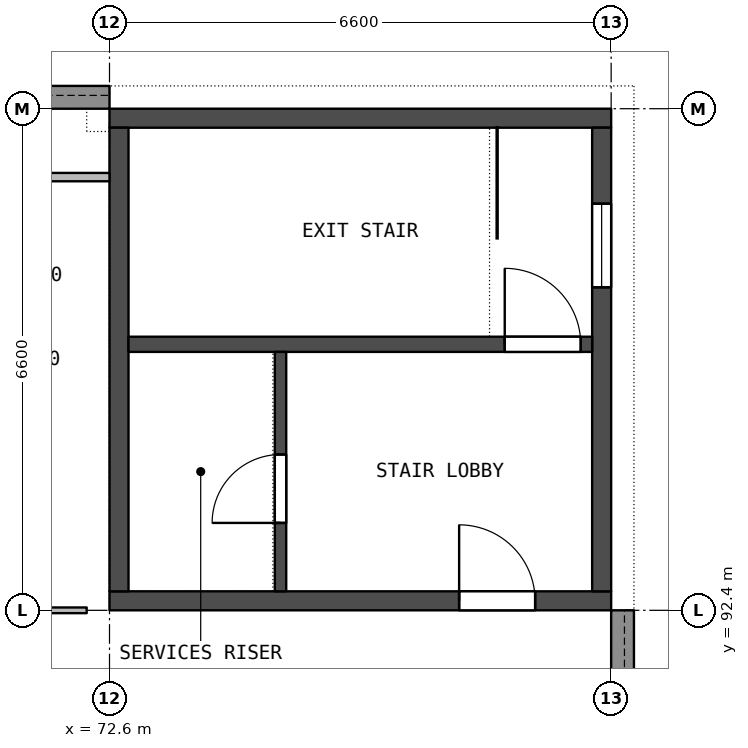
"""IFC4 building model, lengths in metres.
Left out: names, types, materials, properties, quantities, classifications, styles, units other than length and angle.
Written with IfcOpenShell. Run it as: python <this file> out.ifc"""

import sys

from ifc_helpers import new_model, si_unit, direction, frame, frame_2d, origin, place, context, subcontext, project, spatial, rectangle, extrude, element, fill, save


model = new_model("IFC4")
c1 = context("Model", 3, precision=1e-05, world=origin(), true_north=direction((0.0, 1.0)))
c2 = subcontext(c1, "Body", "Model", "MODEL_VIEW")
j1 = project(units=[si_unit("LENGTHUNIT", "METRE"), si_unit("PLANEANGLEUNIT", "RADIAN")], contexts=[c1])
p1 = place(None, origin())
s1 = spatial("IfcSite", under=j1, at=p1, CompositionType="ELEMENT")
p2 = place(p1, origin())
s2 = spatial("IfcBuilding", under=s1, at=p2, CompositionType="ELEMENT")
p3 = place(p2, frame((0.0, 0.0, 18.9)))
s3 = spatial("IfcBuildingStorey", under=s2, at=p3, CompositionType="ELEMENT", Elevation=18.9)
p4 = place(p3, frame((72.6, 92.525, 0.0), z_axis=(0.0, 0.0, 1.0), x_axis=(1.0, 0.0, 0.0)))
e1 = element("IfcWall", 1, at=p4, inside=s3, PredefinedType="SHEAR", context=c2, shape_type="SweptSolid", body=[
    extrude(rectangle(XDim=6.6, YDim=0.25, at=frame_2d((3.3, 0.0))), origin(), (0.0, 0.0, 1.0), 4.25),
])
p5 = place(p4, frame((4.6, 0.0, 0.0)))
e2 = element("IfcOpeningElement", 2, at=p5, cuts=e1, PredefinedType="OPENING", context=c2, shape_type="SweptSolid", body=[
    extrude(rectangle(XDim=1.0, YDim=2.1, at=frame_2d((0.5, 1.05))), frame((0.0, 0.135, 0.0), z_axis=(0.0, -1.0, 0.0), x_axis=(1.0, 0.0, 0.0)), (0.0, 0.0, 1.0), 0.27),
])
p6 = place(p3, frame((72.6, 98.875, 0.0), z_axis=(0.0, 0.0, 1.0), x_axis=(1.0, 0.0, 0.0)))
e3 = element("IfcWall", 3, at=p6, inside=s3, PredefinedType="SHEAR", context=c2, shape_type="SweptSolid", body=[
    extrude(rectangle(XDim=6.6, YDim=0.25, at=frame_2d((3.3, 0.0))), origin(), (0.0, 0.0, 1.0), 4.25),
])
p7 = place(p3, frame((79.075, 92.65, 0.0), z_axis=(0.0, 0.0, 1.0), x_axis=(0.0, 1.0, 0.0)))
e4 = element("IfcWall", 4, at=p7, inside=s3, PredefinedType="SHEAR", context=c2, shape_type="SweptSolid", body=[
    extrude(rectangle(XDim=6.1, YDim=0.25, at=frame_2d((3.05, 0.0))), origin(), (0.0, 0.0, 1.0), 4.25),
])
p8 = place(p7, frame((4.0, 0.0, 0.7)))
e5 = element("IfcOpeningElement", 5, at=p8, cuts=e4, PredefinedType="OPENING", context=c2, shape_type="SweptSolid", body=[
    extrude(rectangle(XDim=1.1, YDim=1.5, at=frame_2d((0.55, 0.75))), frame((0.0, 0.135, 0.0), z_axis=(0.0, -1.0, 0.0), x_axis=(1.0, 0.0, 0.0)), (0.0, 0.0, 1.0), 0.27),
])
p9 = place(p3, frame((72.725, 92.65, 0.0), z_axis=(0.0, 0.0, 1.0), x_axis=(0.0, 1.0, 0.0)))
e6 = element("IfcWall", 6, at=p9, inside=s3, PredefinedType="SHEAR", context=c2, shape_type="SweptSolid", body=[
    extrude(rectangle(XDim=6.1, YDim=0.25, at=frame_2d((3.05, 0.0))), origin(), (0.0, 0.0, 1.0), 4.25),
])
p10 = place(p3, frame((72.85, 95.9, 0.0), z_axis=(0.0, 0.0, 1.0), x_axis=(1.0, 0.0, 0.0)))
e7 = element("IfcWall", 7, at=p10, inside=s3, PredefinedType="SHEAR", context=c2, shape_type="SweptSolid", body=[
    extrude(rectangle(XDim=6.1, YDim=0.2, at=frame_2d((3.05, 0.0))), origin(), (0.0, 0.0, 1.0), 4.25),
])
p11 = place(p10, frame((4.95, 0.0, 0.0)))
e8 = element("IfcOpeningElement", 8, at=p11, cuts=e7, PredefinedType="OPENING", context=c2, shape_type="SweptSolid", body=[
    extrude(rectangle(XDim=1.0, YDim=2.1, at=frame_2d((0.5, 1.05))), frame((0.0, 0.11, 0.0), z_axis=(0.0, -1.0, 0.0), x_axis=(1.0, 0.0, 0.0)), (0.0, 0.0, 1.0), 0.22),
])
p12 = place(p3, frame((74.85, 92.65, 0.0), z_axis=(0.0, 0.0, 1.0), x_axis=(0.0, 1.0, 0.0)))
e9 = element("IfcWall", 9, at=p12, inside=s3, PredefinedType="SHEAR", context=c2, shape_type="SweptSolid", body=[
    extrude(rectangle(XDim=3.15, YDim=0.15, at=frame_2d((1.575, 0.0))), origin(), (0.0, 0.0, 1.0), 4.25),
])
p13 = place(p12, frame((0.9, 0.0, 0.0)))
e10 = element("IfcOpeningElement", 10, at=p13, cuts=e9, PredefinedType="OPENING", context=c2, shape_type="SweptSolid", body=[
    extrude(rectangle(XDim=0.9, YDim=2.1, at=frame_2d((0.45, 1.05))), frame((0.0, 0.085, 0.0), z_axis=(0.0, -1.0, 0.0), x_axis=(1.0, 0.0, 0.0)), (0.0, 0.0, 1.0), 0.17),
])
p14 = place(p3, frame((79.35, 92.4, 0.0), z_axis=(0.0, 0.0, 1.0), x_axis=(0.0, -1.0, 0.0)))
e11 = element("IfcWall", 11, at=p14, inside=s3, PredefinedType="STANDARD", context=c2, shape_type="SweptSolid", body=[
    extrude(rectangle(XDim=3.1, YDim=0.3, at=frame_2d((1.55, 0.0))), origin(), (0.0, 0.0, 1.0), 3.65),
])
p15 = place(p14, frame((1.05, 0.0, 1.1)))
e12 = element("IfcOpeningElement", 12, at=p15, cuts=e11, PredefinedType="OPENING", context=c2, shape_type="SweptSolid", body=[
    extrude(rectangle(XDim=1.2, YDim=1.2, at=frame_2d((0.6, 0.6))), frame((0.0, 0.16, 0.0), z_axis=(0.0, -1.0, 0.0), x_axis=(1.0, 0.0, 0.0)), (0.0, 0.0, 1.0), 0.32),
])
p16 = place(p3, frame((66.3, 99.15, 0.0), z_axis=(0.0, 0.0, 1.0), x_axis=(1.0, 0.0, 0.0)))
e13 = element("IfcWall", 13, at=p16, inside=s3, PredefinedType="STANDARD", context=c2, shape_type="SweptSolid", body=[
    extrude(rectangle(XDim=6.3, YDim=0.3, at=frame_2d((3.15, 0.0))), origin(), (0.0, 0.0, 1.0), 3.65),
])
p17 = place(p3, frame((66.3, 92.4, 0.0), z_axis=(0.0, 0.0, 1.0), x_axis=(1.0, 0.0, 0.0)))
e14 = element("IfcWall", 14, at=p17, inside=s3, PredefinedType="PARTITIONING", context=c2, shape_type="SweptSolid", body=[
    extrude(rectangle(XDim=6.0, YDim=0.075, at=frame_2d((3.0, 0.0))), origin(), (0.0, 0.0, 1.0), 3.65),
])
p18 = place(p17, frame((0.9, 0.0, 0.0)))
e15 = element("IfcOpeningElement", 15, at=p18, cuts=e14, PredefinedType="OPENING", context=c2, shape_type="SweptSolid", body=[
    extrude(rectangle(XDim=0.9, YDim=2.1, at=frame_2d((0.45, 1.05))), frame((0.0, 0.047, 0.0), z_axis=(0.0, -1.0, 0.0), x_axis=(1.0, 0.0, 0.0)), (0.0, 0.0, 1.0), 0.095),
])
p19 = place(p3, frame((72.6, 98.1, 0.0), z_axis=(0.0, 0.0, 1.0), x_axis=(-1.0, 0.0, 0.0)))
e16 = element("IfcWall", 16, at=p19, inside=s3, PredefinedType="PARTITIONING", context=c2, shape_type="SweptSolid", body=[
    extrude(rectangle(XDim=3.245, YDim=0.11, at=frame_2d((1.623, 0.0))), origin(), (0.0, 0.0, 1.0), 4.25),
])
p20 = place(p19, frame((1.35, 0.0, 0.0)))
e17 = element("IfcOpeningElement", 17, at=p20, cuts=e16, PredefinedType="OPENING", context=c2, shape_type="SweptSolid", body=[
    extrude(rectangle(XDim=0.6, YDim=2.1, at=frame_2d((0.3, 1.05))), frame((0.0, 0.065, 0.0), z_axis=(0.0, -1.0, 0.0), x_axis=(1.0, 0.0, 0.0)), (0.0, 0.0, 1.0), 0.13),
])
p21 = place(p13, origin())
e18 = element("IfcDoor", 18, at=p21, inside=s3, OperationType="SINGLE_SWING_LEFT", PredefinedType="DOOR", context=c2, shape_type="SweptSolid", body=[
    extrude(rectangle(XDim=0.9, YDim=2.1, at=frame_2d((0.45, 1.05))), frame((0.0, 0.025, 0.0), z_axis=(0.0, -1.0, 0.0), x_axis=(1.0, 0.0, 0.0)), (0.0, 0.0, 1.0), 0.05),
])
fill(e10, e18)
p22 = place(p5, origin())
e19 = element("IfcDoor", 19, at=p22, inside=s3, OperationType="SINGLE_SWING_LEFT", PredefinedType="DOOR", context=c2, shape_type="SweptSolid", body=[
    extrude(rectangle(XDim=1.0, YDim=2.1, at=frame_2d((0.5, 1.05))), frame((0.0, 0.025, 0.0), z_axis=(0.0, -1.0, 0.0), x_axis=(1.0, 0.0, 0.0)), (0.0, 0.0, 1.0), 0.05),
])
fill(e2, e19)
p23 = place(p11, origin())
e20 = element("IfcDoor", 20, at=p23, inside=s3, OperationType="SINGLE_SWING_LEFT", PredefinedType="DOOR", context=c2, shape_type="SweptSolid", body=[
    extrude(rectangle(XDim=1.0, YDim=2.1, at=frame_2d((0.5, 1.05))), frame((0.0, 0.025, 0.0), z_axis=(0.0, -1.0, 0.0), x_axis=(1.0, 0.0, 0.0)), (0.0, 0.0, 1.0), 0.05),
])
fill(e8, e20)
p24 = place(p8, origin())
e21 = element("IfcWindow", 21, at=p24, inside=s3, PartitioningType="SINGLE_PANEL", PredefinedType="WINDOW", context=c2, shape_type="SweptSolid", body=[
    extrude(rectangle(XDim=1.1, YDim=1.5, at=frame_2d((0.55, 0.75))), frame((0.0, 0.03, 0.0), z_axis=(0.0, -1.0, 0.0), x_axis=(1.0, 0.0, 0.0)), (0.0, 0.0, 1.0), 0.06),
])
fill(e5, e21)
save(model, sys.argv[1])
